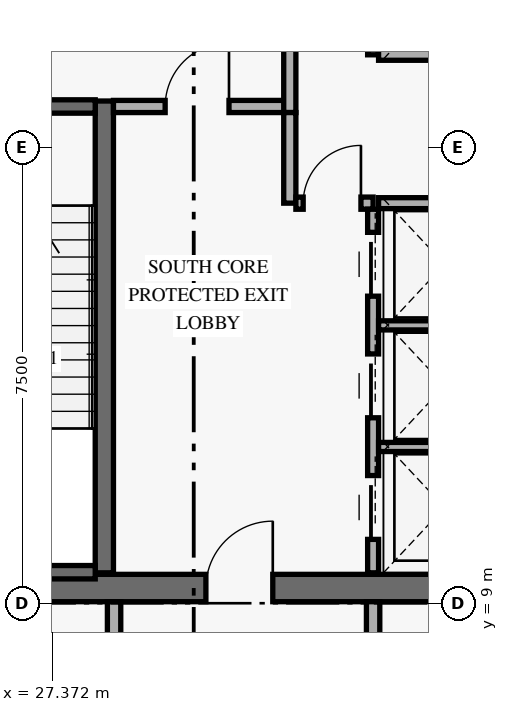
"""IFC4 building model, lengths in metres.
Left out: names, types, materials, properties, quantities, classifications, styles, units other than length and angle.
Written with IfcOpenShell. Run it as: python <this file> out.ifc"""

import sys

from ifc_helpers import new_model, si_unit, direction, frame, frame_2d, origin, place, context, subcontext, project, spatial, rectangle, extrude, element, fill, save


model = new_model("IFC4")
c1 = context("Model", 3, precision=1e-05, world=origin(), true_north=direction((0.0, 1.0)))
c2 = subcontext(c1, "Body", "Model", "MODEL_VIEW")
j1 = project(units=[si_unit("LENGTHUNIT", "METRE"), si_unit("PLANEANGLEUNIT", "RADIAN")], contexts=[c1])
p1 = place(None, origin())
s1 = spatial("IfcSite", under=j1, at=p1, CompositionType="ELEMENT")
p2 = place(p1, origin())
s2 = spatial("IfcBuilding", under=s1, at=p2, CompositionType="ELEMENT")
p3 = place(p2, origin())
s3 = spatial("IfcBuildingStorey", under=s2, at=p3, CompositionType="ELEMENT", Elevation=0.0)
p4 = place(p3, frame((24.7, 9.25, 0.0), z_axis=(0.0, 0.0, 1.0), x_axis=(1.0, 0.0, 0.0)))
e1 = element("IfcWall", 1, at=p4, inside=s3, PredefinedType="SHEAR", context=c2, shape_type="SweptSolid", body=[
    extrude(rectangle(XDim=10.0, YDim=0.45, at=frame_2d((5.0, 0.0))), origin(), (0.0, 0.0, 1.0), 4.39),
])
p5 = place(p4, frame((5.2, 0.0, 0.0)))
e2 = element("IfcOpeningElement", 2, at=p5, cuts=e1, PredefinedType="OPENING", context=c2, shape_type="SweptSolid", body=[
    extrude(rectangle(XDim=1.1, YDim=2.15, at=frame_2d((0.55, 1.075))), frame((0.0, 0.235, 0.0), z_axis=(0.0, -1.0, 0.0), x_axis=(1.0, 0.0, 0.0)), (0.0, 0.0, 1.0), 0.47),
])
p6 = place(p3, frame((28.23, 9.5, 0.0), z_axis=(0.0, 0.0, 1.0), x_axis=(0.0, 1.0, 0.0)))
e3 = element("IfcWall", 3, at=p6, inside=s3, PredefinedType="SHEAR", context=c2, shape_type="SweptSolid", body=[
    extrude(rectangle(XDim=7.76, YDim=0.3, at=frame_2d((3.88, 0.0))), origin(), (0.0, 0.0, 1.0), 4.39),
])
p7 = place(p3, frame((24.92, 9.51, 0.0), z_axis=(0.0, 0.0, 1.0), x_axis=(1.0, 0.0, 0.0)))
e4 = element("IfcWall", 4, at=p7, inside=s3, PredefinedType="SHEAR", context=c2, shape_type="SweptSolid", body=[
    extrude(rectangle(XDim=3.16, YDim=0.22, at=frame_2d((1.58, 0.0))), origin(), (0.0, 0.0, 1.0), 4.39),
])
p8 = place(p3, frame((24.92, 17.17, 0.0), z_axis=(0.0, 0.0, 1.0), x_axis=(1.0, 0.0, 0.0)))
e5 = element("IfcWall", 5, at=p8, inside=s3, PredefinedType="SHEAR", context=c2, shape_type="SweptSolid", body=[
    extrude(rectangle(XDim=3.16, YDim=0.22, at=frame_2d((1.58, 0.0))), origin(), (0.0, 0.0, 1.0), 4.39),
])
p9 = place(p8, frame((0.78, 0.0, 0.0)))
e6 = element("IfcOpeningElement", 6, at=p9, cuts=e5, PredefinedType="OPENING", context=c2, shape_type="SweptSolid", body=[
    extrude(rectangle(XDim=1.05, YDim=2.15, at=frame_2d((0.525, 1.075))), frame((0.0, 0.12, 0.0), z_axis=(0.0, -1.0, 0.0), x_axis=(1.0, 0.0, 0.0)), (0.0, 0.0, 1.0), 0.24),
])
p10 = place(p3, frame((28.38, 17.17, 0.0), z_axis=(0.0, 0.0, 1.0), x_axis=(1.0, 0.0, 0.0)))
e7 = element("IfcWall", 7, at=p10, inside=s3, PredefinedType="STANDARD", context=c2, shape_type="SweptSolid", body=[
    extrude(rectangle(XDim=2.9, YDim=0.2, at=frame_2d((1.45, 0.0))), origin(), (0.0, 0.0, 1.0), 4.39),
])
p11 = place(p10, frame((0.85, 0.0, 0.0)))
e8 = element("IfcOpeningElement", 8, at=p11, cuts=e7, PredefinedType="OPENING", context=c2, shape_type="SweptSolid", body=[
    extrude(rectangle(XDim=1.05, YDim=2.15, at=frame_2d((0.525, 1.075))), frame((0.0, 0.11, 0.0), z_axis=(0.0, -1.0, 0.0), x_axis=(1.0, 0.0, 0.0)), (0.0, 0.0, 1.0), 0.22),
])
p12 = place(p3, frame((31.28, 17.07, 0.0), z_axis=(0.0, 0.0, 1.0), x_axis=(0.0, 1.0, 0.0)))
e9 = element("IfcWall", 9, at=p12, inside=s3, PredefinedType="STANDARD", context=c2, shape_type="SweptSolid", body=[
    extrude(rectangle(XDim=3.92, YDim=0.2, at=frame_2d((1.96, 0.0))), origin(), (0.0, 0.0, 1.0), 3.272),
])
p13 = place(p12, frame((1.35, 0.0, 0.0)))
e10 = element("IfcOpeningElement", 10, at=p13, cuts=e9, PredefinedType="OPENING", context=c2, shape_type="SweptSolid", body=[
    extrude(rectangle(XDim=1.2, YDim=2.15, at=frame_2d((0.6, 1.075))), frame((0.0, 0.11, 0.0), z_axis=(0.0, -1.0, 0.0), x_axis=(1.0, 0.0, 0.0)), (0.0, 0.0, 1.0), 0.22),
])
p14 = place(p3, frame((31.28, 15.58, 0.0), z_axis=(0.0, 0.0, 1.0), x_axis=(0.0, 1.0, 0.0)))
e11 = element("IfcWall", 11, at=p14, inside=s3, PredefinedType="STANDARD", context=c2, shape_type="SweptSolid", body=[
    extrude(rectangle(XDim=1.49, YDim=0.2, at=frame_2d((0.745, 0.0))), origin(), (0.0, 0.0, 1.0), 4.39),
])
p15 = place(p3, frame((31.38, 15.58, 0.0), z_axis=(0.0, 0.0, 1.0), x_axis=(1.0, 0.0, 0.0)))
e12 = element("IfcWall", 12, at=p15, inside=s3, PredefinedType="STANDARD", context=c2, shape_type="SweptSolid", body=[
    extrude(rectangle(XDim=1.27, YDim=0.2, at=frame_2d((0.635, 0.0))), origin(), (0.0, 0.0, 1.0), 4.39),
])
p16 = place(p15, frame((0.12, 0.0, 0.0)))
e13 = element("IfcOpeningElement", 13, at=p16, cuts=e12, PredefinedType="OPENING", context=c2, shape_type="SweptSolid", body=[
    extrude(rectangle(XDim=0.95, YDim=2.15, at=frame_2d((0.475, 1.075))), frame((0.0, 0.11, 0.0), z_axis=(0.0, -1.0, 0.0), x_axis=(1.0, 0.0, 0.0)), (0.0, 0.0, 1.0), 0.22),
])
p17 = place(p3, frame((32.65, 9.5, 0.0), z_axis=(0.0, 0.0, 1.0), x_axis=(0.0, 1.0, 0.0)))
e14 = element("IfcWall", 14, at=p17, inside=s3, PredefinedType="STANDARD", context=c2, shape_type="SweptSolid", body=[
    extrude(rectangle(XDim=5.98, YDim=0.18, at=frame_2d((2.99, 0.0))), origin(), (0.0, 0.0, 1.0), 4.39),
])
p18 = place(p17, frame((0.55, 0.0, 0.0)))
e15 = element("IfcOpeningElement", 15, at=p18, cuts=e14, PredefinedType="OPENING", context=c2, shape_type="SweptSolid", body=[
    extrude(rectangle(XDim=1.05, YDim=2.2, at=frame_2d((0.525, 1.1))), frame((0.0, 0.1, 0.0), z_axis=(0.0, -1.0, 0.0), x_axis=(1.0, 0.0, 0.0)), (0.0, 0.0, 1.0), 0.2),
])
p19 = place(p17, frame((2.55, 0.0, 0.0)))
e16 = element("IfcOpeningElement", 16, at=p19, cuts=e14, PredefinedType="OPENING", context=c2, shape_type="SweptSolid", body=[
    extrude(rectangle(XDim=1.05, YDim=2.2, at=frame_2d((0.525, 1.1))), frame((0.0, 0.1, 0.0), z_axis=(0.0, -1.0, 0.0), x_axis=(1.0, 0.0, 0.0)), (0.0, 0.0, 1.0), 0.2),
])
p20 = place(p17, frame((4.55, 0.0, 0.0)))
e17 = element("IfcOpeningElement", 17, at=p20, cuts=e14, PredefinedType="OPENING", context=c2, shape_type="SweptSolid", body=[
    extrude(rectangle(XDim=1.05, YDim=2.2, at=frame_2d((0.525, 1.1))), frame((0.0, 0.1, 0.0), z_axis=(0.0, -1.0, 0.0), x_axis=(1.0, 0.0, 0.0)), (0.0, 0.0, 1.0), 0.2),
])
p21 = place(p3, frame((32.74, 15.58, 0.0), z_axis=(0.0, 0.0, 1.0), x_axis=(1.0, 0.0, 0.0)))
e18 = element("IfcWall", 18, at=p21, inside=s3, PredefinedType="STANDARD", context=c2, shape_type="SweptSolid", body=[
    extrude(rectangle(XDim=2.21, YDim=0.18, at=frame_2d((1.105, 0.0))), origin(), (0.0, 0.0, 1.0), 4.39),
])
for number, where, z_axis, x_axis in (
    (19, (32.74, 11.57, 0.0), (0.0, 0.0, 1.0), (1.0, 0.0, 0.0)),
    (20, (32.74, 13.57, 0.0), (0.0, 0.0, 1.0), (1.0, 0.0, 0.0)),
):
    element("IfcWall", number, at=place(p3, frame(where, z_axis=z_axis, x_axis=x_axis)), inside=s3, PredefinedType="STANDARD", context=c2, shape_type="SweptSolid", body=[
        extrude(rectangle(XDim=2.21, YDim=0.15, at=frame_2d((1.105, 0.0))), origin(), (0.0, 0.0, 1.0), 4.39),
    ])
p22 = place(p3, frame((32.65, 18.02, 0.0), z_axis=(0.0, 0.0, 1.0), x_axis=(0.0, 1.0, 0.0)))
e21 = element("IfcWall", 21, at=p22, inside=s3, PredefinedType="STANDARD", context=c2, shape_type="SweptSolid", body=[
    extrude(rectangle(XDim=10.06, YDim=0.18, at=frame_2d((5.03, 0.0))), origin(), (0.0, 0.0, 1.0), 4.39),
])
p23 = place(p22, frame((0.48, 0.0, 0.0)))
e22 = element("IfcOpeningElement", 22, at=p23, cuts=e21, PredefinedType="OPENING", context=c2, shape_type="SweptSolid", body=[
    extrude(rectangle(XDim=1.05, YDim=2.2, at=frame_2d((0.525, 1.1))), frame((0.0, 0.1, 0.0), z_axis=(0.0, -1.0, 0.0), x_axis=(1.0, 0.0, 0.0)), (0.0, 0.0, 1.0), 0.2),
])
p24 = place(p22, frame((2.48, 0.0, 0.0)))
e23 = element("IfcOpeningElement", 23, at=p24, cuts=e21, PredefinedType="OPENING", context=c2, shape_type="SweptSolid", body=[
    extrude(rectangle(XDim=1.05, YDim=2.2, at=frame_2d((0.525, 1.1))), frame((0.0, 0.1, 0.0), z_axis=(0.0, -1.0, 0.0), x_axis=(1.0, 0.0, 0.0)), (0.0, 0.0, 1.0), 0.2),
])
p25 = place(p22, frame((4.48, 0.0, 0.0)))
e24 = element("IfcOpeningElement", 24, at=p25, cuts=e21, PredefinedType="OPENING", context=c2, shape_type="SweptSolid", body=[
    extrude(rectangle(XDim=1.05, YDim=2.2, at=frame_2d((0.525, 1.1))), frame((0.0, 0.1, 0.0), z_axis=(0.0, -1.0, 0.0), x_axis=(1.0, 0.0, 0.0)), (0.0, 0.0, 1.0), 0.2),
])
p26 = place(p22, frame((6.53, 0.0, 0.0)))
e25 = element("IfcOpeningElement", 25, at=p26, cuts=e21, PredefinedType="OPENING", context=c2, shape_type="SweptSolid", body=[
    extrude(rectangle(XDim=1.05, YDim=2.2, at=frame_2d((0.525, 1.1))), frame((0.0, 0.1, 0.0), z_axis=(0.0, -1.0, 0.0), x_axis=(1.0, 0.0, 0.0)), (0.0, 0.0, 1.0), 0.2),
])
p27 = place(p22, frame((8.53, 0.0, 0.0)))
e26 = element("IfcOpeningElement", 26, at=p27, cuts=e21, PredefinedType="OPENING", context=c2, shape_type="SweptSolid", body=[
    extrude(rectangle(XDim=1.05, YDim=2.2, at=frame_2d((0.525, 1.1))), frame((0.0, 0.1, 0.0), z_axis=(0.0, -1.0, 0.0), x_axis=(1.0, 0.0, 0.0)), (0.0, 0.0, 1.0), 0.2),
])
p28 = place(p3, frame((32.74, 18.02, 0.0), z_axis=(0.0, 0.0, 1.0), x_axis=(1.0, 0.0, 0.0)))
e27 = element("IfcWall", 27, at=p28, inside=s3, PredefinedType="STANDARD", context=c2, shape_type="SweptSolid", body=[
    extrude(rectangle(XDim=2.21, YDim=0.18, at=frame_2d((1.105, 0.0))), origin(), (0.0, 0.0, 1.0), 4.39),
])
p29 = place(p3, frame((28.39, 0.32, 0.0), z_axis=(0.0, 0.0, 1.0), x_axis=(0.0, 1.0, 0.0)))
e28 = element("IfcWall", 28, at=p29, inside=s3, PredefinedType="STANDARD", context=c2, shape_type="SweptSolid", body=[
    extrude(rectangle(XDim=8.705, YDim=0.22, at=frame_2d((4.353, 0.0))), origin(), (0.0, 0.0, 1.0), 3.761),
])
p30 = place(p3, frame((32.65, 0.32, 0.0), z_axis=(0.0, 0.0, 1.0), x_axis=(0.0, 1.0, 0.0)))
e29 = element("IfcWall", 29, at=p30, inside=s3, PredefinedType="STANDARD", context=c2, shape_type="SweptSolid", body=[
    extrude(rectangle(XDim=8.705, YDim=0.22, at=frame_2d((4.353, 0.0))), origin(), (0.0, 0.0, 1.0), 3.761),
])
p31 = place(p30, frame((4.3, 0.0, 0.0)))
e30 = element("IfcOpeningElement", 30, at=p31, cuts=e29, PredefinedType="OPENING", context=c2, shape_type="SweptSolid", body=[
    extrude(rectangle(XDim=1.05, YDim=2.15, at=frame_2d((0.525, 1.075))), frame((0.0, 0.12, 0.0), z_axis=(0.0, -1.0, 0.0), x_axis=(1.0, 0.0, 0.0)), (0.0, 0.0, 1.0), 0.24),
])
p32 = place(p11, origin())
e31 = element("IfcDoor", 31, at=p32, inside=s3, OperationType="SINGLE_SWING_RIGHT", PredefinedType="DOOR", context=c2, shape_type="SweptSolid", body=[
    extrude(rectangle(XDim=1.05, YDim=2.15, at=frame_2d((0.525, 1.075))), frame((0.0, 0.025, 0.0), z_axis=(0.0, -1.0, 0.0), x_axis=(1.0, 0.0, 0.0)), (0.0, 0.0, 1.0), 0.05),
])
fill(e8, e31)
p33 = place(p16, frame((0.95, 0.0, 0.0), z_axis=(0.0, 0.0, 1.0), x_axis=(-1.0, 0.0, 0.0)))
e32 = element("IfcDoor", 32, at=p33, inside=s3, OperationType="SINGLE_SWING_LEFT", PredefinedType="DOOR", context=c2, shape_type="SweptSolid", body=[
    extrude(rectangle(XDim=0.95, YDim=2.15, at=frame_2d((0.475, 1.075))), frame((0.0, 0.025, 0.0), z_axis=(0.0, -1.0, 0.0), x_axis=(1.0, 0.0, 0.0)), (0.0, 0.0, 1.0), 0.05),
])
fill(e13, e32)
p34 = place(p18, origin())
e33 = element("IfcDoor", 33, at=p34, inside=s3, OperationType="SLIDING_TO_LEFT", PredefinedType="DOOR", context=c2, shape_type="SweptSolid", body=[
    extrude(rectangle(XDim=1.05, YDim=2.2, at=frame_2d((0.525, 1.1))), frame((0.0, 0.025, 0.0), z_axis=(0.0, -1.0, 0.0), x_axis=(1.0, 0.0, 0.0)), (0.0, 0.0, 1.0), 0.05),
])
fill(e15, e33)
p35 = place(p19, origin())
e34 = element("IfcDoor", 34, at=p35, inside=s3, OperationType="SLIDING_TO_LEFT", PredefinedType="DOOR", context=c2, shape_type="SweptSolid", body=[
    extrude(rectangle(XDim=1.05, YDim=2.2, at=frame_2d((0.525, 1.1))), frame((0.0, 0.025, 0.0), z_axis=(0.0, -1.0, 0.0), x_axis=(1.0, 0.0, 0.0)), (0.0, 0.0, 1.0), 0.05),
])
fill(e16, e34)
p36 = place(p20, origin())
e35 = element("IfcDoor", 35, at=p36, inside=s3, OperationType="SLIDING_TO_LEFT", PredefinedType="DOOR", context=c2, shape_type="SweptSolid", body=[
    extrude(rectangle(XDim=1.05, YDim=2.2, at=frame_2d((0.525, 1.1))), frame((0.0, 0.025, 0.0), z_axis=(0.0, -1.0, 0.0), x_axis=(1.0, 0.0, 0.0)), (0.0, 0.0, 1.0), 0.05),
])
fill(e17, e35)
p37 = place(p5, frame((1.1, 0.0, 0.0), z_axis=(0.0, 0.0, 1.0), x_axis=(-1.0, 0.0, 0.0)))
e36 = element("IfcDoor", 36, at=p37, inside=s3, OperationType="SINGLE_SWING_LEFT", PredefinedType="DOOR", context=c2, shape_type="SweptSolid", body=[
    extrude(rectangle(XDim=1.1, YDim=2.15, at=frame_2d((0.55, 1.075))), frame((0.0, 0.025, 0.0), z_axis=(0.0, -1.0, 0.0), x_axis=(1.0, 0.0, 0.0)), (0.0, 0.0, 1.0), 0.05),
])
fill(e2, e36)
save(model, sys.argv[1])
